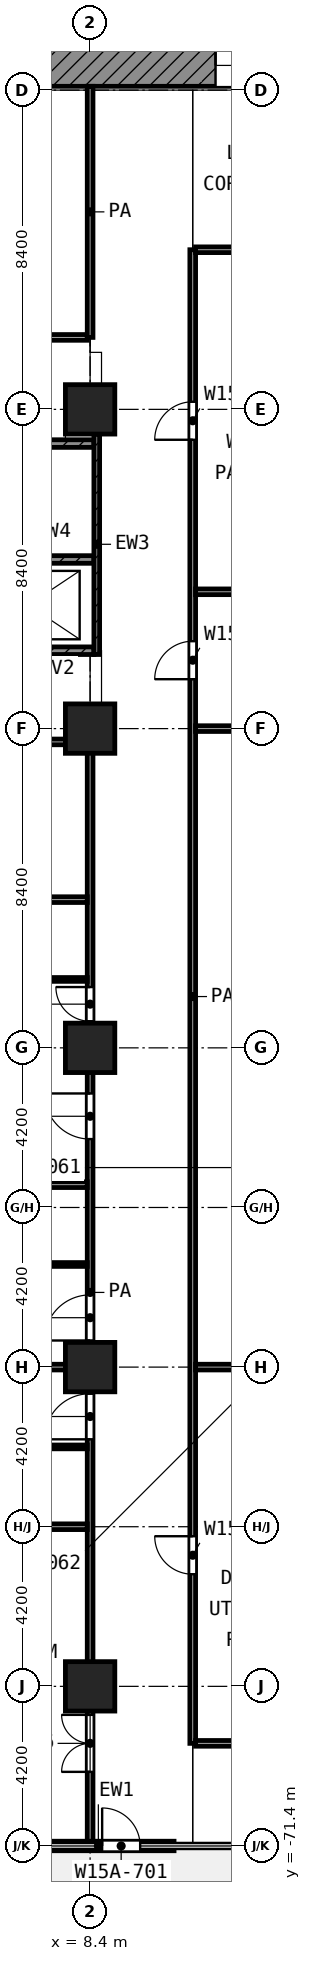
"""IFC4 building model, lengths in metres.
Left out: names, types, materials, properties, quantities, classifications, styles, units other than length and angle.
Written with IfcOpenShell. Run it as: python <this file> out.ifc"""

import sys

from ifc_helpers import new_model, si_unit, direction, frame, frame_2d, origin, origin_2d, place, context, subcontext, project, spatial, rectangle, extrude, element, fill, save


model = new_model("IFC4")
c1 = context("Model", 3, precision=1e-05, world=origin(), true_north=direction((0.0, 1.0)))
c2 = subcontext(c1, "Body", "Model", "MODEL_VIEW")
j1 = project(units=[si_unit("LENGTHUNIT", "METRE"), si_unit("PLANEANGLEUNIT", "RADIAN")], contexts=[c1])
p1 = place(None, origin())
s1 = spatial("IfcSite", under=j1, at=p1, CompositionType="ELEMENT")
p2 = place(p1, origin())
s2 = spatial("IfcBuilding", under=s1, at=p2, CompositionType="ELEMENT")
p3 = place(p2, frame((0.0, 0.0, 68.6)))
s3 = spatial("IfcBuildingStorey", under=s2, at=p3, CompositionType="ELEMENT", Elevation=68.6)
for number, where, z_axis, x_axis in (
    (1, (8.4, -33.6, 0.0), (0.0, 0.0, 1.0), (1.0, 0.0, 0.0)),
    (2, (8.4, -42.0, 0.0), (0.0, 0.0, 1.0), (1.0, 0.0, 0.0)),
    (3, (8.4, -50.4, 0.0), (0.0, 0.0, 1.0), (1.0, 0.0, 0.0)),
    (4, (8.4, -58.8, 0.0), (0.0, 0.0, 1.0), (1.0, 0.0, 0.0)),
    (5, (8.4, -67.2, 0.0), (0.0, 0.0, 1.0), (1.0, 0.0, 0.0)),
):
    element("IfcColumn", number, at=place(p3, frame(where, z_axis=z_axis, x_axis=x_axis)), inside=s3, PredefinedType="COLUMN", context=c2, shape_type="SweptSolid", body=[
        extrude(rectangle(XDim=1.3, YDim=1.3, at=origin_2d()), origin(), (0.0, 0.0, 1.0), 4.2),
    ])
p4 = place(p3, frame((6.625, -71.4, 0.0), z_axis=(0.0, 0.0, 1.0), x_axis=(1.0, 0.0, 0.0)))
e6 = element("IfcWall", 6, at=p4, inside=s3, PredefinedType="SOLIDWALL", context=c2, shape_type="SweptSolid", body=[
    extrude(rectangle(XDim=3.983, YDim=0.25, at=frame_2d((1.992, 0.0))), origin(), (0.0, 0.0, 1.0), 3.78),
])
p5 = place(p4, frame((2.092, 0.0, 0.0)))
e7 = element("IfcOpeningElement", 7, at=p5, cuts=e6, PredefinedType="OPENING", context=c2, shape_type="SweptSolid", body=[
    extrude(rectangle(XDim=1.0, YDim=2.1, at=frame_2d((0.5, 1.05))), frame((0.0, 0.135, 0.0), z_axis=(0.0, -1.0, 0.0), x_axis=(1.0, 0.0, 0.0)), (0.0, 0.0, 1.0), 0.27),
])
p6 = place(p3, frame((5.4, -24.55, 0.0), z_axis=(0.0, 0.0, 1.0), x_axis=(1.0, 0.0, 0.0)))
e8 = element("IfcWall", 8, at=p6, inside=s3, PredefinedType="SHEAR", context=c2, shape_type="SweptSolid", body=[
    extrude(rectangle(XDim=18.6, YDim=1.1, at=frame_2d((9.3, 0.0))), origin(), (0.0, 0.0, 1.0), 3.9),
])
p7 = place(p6, frame((6.3, 0.0, 0.0)))
e9 = element("IfcOpeningElement", 9, at=p7, cuts=e8, PredefinedType="OPENING", context=c2, shape_type="SweptSolid", body=[
    extrude(rectangle(XDim=1.8, YDim=2.1, at=frame_2d((0.9, 1.05))), frame((0.0, 0.56, 0.0), z_axis=(0.0, -1.0, 0.0), x_axis=(1.0, 0.0, 0.0)), (0.0, 0.0, 1.0), 1.12),
])
p8 = place(p3, frame((8.575, -40.05, 0.0), z_axis=(0.0, 0.0, 1.0), x_axis=(0.0, 1.0, 0.0)))
e10 = element("IfcWall", 10, at=p8, inside=s3, PredefinedType="SHEAR", context=c2, shape_type="SweptSolid", body=[
    extrude(rectangle(XDim=5.8, YDim=0.15, at=frame_2d((2.9, 0.0))), origin(), (0.0, 0.0, 1.0), 3.9),
])
p9 = place(p3, frame((0.45, -34.5, 0.0), z_axis=(0.0, 0.0, 1.0), x_axis=(1.0, 0.0, 0.0)))
e11 = element("IfcWall", 11, at=p9, inside=s3, PredefinedType="SHEAR", context=c2, shape_type="SweptSolid", body=[
    extrude(rectangle(XDim=8.05, YDim=0.2, at=frame_2d((4.025, 0.0))), origin(), (0.0, 0.0, 1.0), 3.9),
])
p10 = place(p9, frame((0.75, 0.0, 0.0)))
e12 = element("IfcOpeningElement", 12, at=p10, cuts=e11, PredefinedType="OPENING", context=c2, shape_type="SweptSolid", body=[
    extrude(rectangle(XDim=1.1, YDim=2.1, at=frame_2d((0.55, 1.05))), frame((0.0, 0.11, 0.0), z_axis=(0.0, -1.0, 0.0), x_axis=(1.0, 0.0, 0.0)), (0.0, 0.0, 1.0), 0.22),
])
p11 = place(p3, frame((0.45, -37.55, 0.0), z_axis=(0.0, 0.0, 1.0), x_axis=(1.0, 0.0, 0.0)))
e13 = element("IfcWall", 13, at=p11, inside=s3, PredefinedType="SHEAR", context=c2, shape_type="SweptSolid", body=[
    extrude(rectangle(XDim=8.05, YDim=0.2, at=frame_2d((4.025, 0.0))), origin(), (0.0, 0.0, 1.0), 3.9),
])
p12 = place(p11, frame((0.1, 0.0, 0.0)))
e14 = element("IfcOpeningElement", 14, at=p12, cuts=e13, PredefinedType="OPENING", context=c2, shape_type="SweptSolid", body=[
    extrude(rectangle(XDim=1.1, YDim=2.1, at=frame_2d((0.55, 1.05))), frame((0.0, 0.11, 0.0), z_axis=(0.0, -1.0, 0.0), x_axis=(1.0, 0.0, 0.0)), (0.0, 0.0, 1.0), 0.22),
])
p13 = place(p3, frame((0.45, -39.95, 0.0), z_axis=(0.0, 0.0, 1.0), x_axis=(1.0, 0.0, 0.0)))
e15 = element("IfcWall", 15, at=p13, inside=s3, PredefinedType="SHEAR", context=c2, shape_type="SweptSolid", body=[
    extrude(rectangle(XDim=8.05, YDim=0.2, at=frame_2d((4.025, 0.0))), origin(), (0.0, 0.0, 1.0), 3.9),
])
p14 = place(p13, frame((2.0, 0.0, 0.0)))
e16 = element("IfcOpeningElement", 16, at=p14, cuts=e15, PredefinedType="OPENING", context=c2, shape_type="SweptSolid", body=[
    extrude(rectangle(XDim=1.1, YDim=2.1, at=frame_2d((0.55, 1.05))), frame((0.0, 0.11, 0.0), z_axis=(0.0, -1.0, 0.0), x_axis=(1.0, 0.0, 0.0)), (0.0, 0.0, 1.0), 0.22),
])
for number, where, z_axis, x_axis in (
    (17, (5.75, -60.9, 0.0), (0.0, 0.0, 1.0), (1.0, 0.0, 0.0)),
    (18, (5.75, -56.1, 0.0), (0.0, 0.0, 1.0), (1.0, 0.0, 0.0)),
):
    element("IfcWall", number, at=place(p3, frame(where, z_axis=z_axis, x_axis=x_axis)), inside=s3, PredefinedType="PARTITIONING", context=c2, shape_type="SweptSolid", body=[
        extrude(rectangle(XDim=2.575, YDim=0.1, at=frame_2d((1.288, 0.0))), origin(), (0.0, 0.0, 1.0), 3.9),
    ])
p15 = place(p3, frame((5.751, -48.6, 0.0), z_axis=(0.0, 0.0, 1.0), x_axis=(1.0, 0.0, 0.0)))
e19 = element("IfcWall", 19, at=p15, inside=s3, PredefinedType="PARTITIONING", context=c2, shape_type="SweptSolid", body=[
    extrude(rectangle(XDim=2.574, YDim=0.1, at=frame_2d((1.287, 0.0))), origin(), (0.0, 0.0, 1.0), 3.9),
])
p16 = place(p3, frame((11.175, -68.7, 0.0), z_axis=(0.0, 0.0, 1.0), x_axis=(1.0, 0.0, 0.0)))
e20 = element("IfcWall", 20, at=p16, inside=s3, PredefinedType="PARTITIONING", context=c2, shape_type="SweptSolid", body=[
    extrude(rectangle(XDim=2.85, YDim=0.15, at=frame_2d((1.425, 0.0))), origin(), (0.0, 0.0, 1.0), 3.9),
])
for number, where, z_axis, x_axis in (
    (21, (0.08, -63.0, 0.0), (0.0, 0.0, 1.0), (1.0, 0.0, 0.0)),
    (22, (0.08, -58.8, 0.0), (0.0, 0.0, 1.0), (1.0, 0.0, 0.0)),
):
    element("IfcWall", number, at=place(p3, frame(where, z_axis=z_axis, x_axis=x_axis)), inside=s3, PredefinedType="PARTITIONING", context=c2, shape_type="SweptSolid", body=[
        extrude(rectangle(XDim=8.245, YDim=0.15, at=frame_2d((4.123, 0.0))), origin(), (0.0, 0.0, 1.0), 3.9),
    ])
p17 = place(p3, frame((11.175, -58.8, 0.0), z_axis=(0.0, 0.0, 1.0), x_axis=(1.0, 0.0, 0.0)))
e23 = element("IfcWall", 23, at=p17, inside=s3, PredefinedType="PARTITIONING", context=c2, shape_type="SweptSolid", body=[
    extrude(rectangle(XDim=2.85, YDim=0.15, at=frame_2d((1.425, 0.0))), origin(), (0.0, 0.0, 1.0), 3.9),
])
for number, where, z_axis, x_axis in (
    (24, (0.08, -54.0, 0.0), (0.0, 0.0, 1.0), (1.0, 0.0, 0.0)),
    (25, (0.08, -46.5, 0.0), (0.0, 0.0, 1.0), (1.0, 0.0, 0.0)),
):
    element("IfcWall", number, at=place(p3, frame(where, z_axis=z_axis, x_axis=x_axis)), inside=s3, PredefinedType="PARTITIONING", context=c2, shape_type="SweptSolid", body=[
        extrude(rectangle(XDim=8.245, YDim=0.15, at=frame_2d((4.123, 0.0))), origin(), (0.0, 0.0, 1.0), 3.9),
    ])
p18 = place(p3, frame((2.326, -42.35, 0.0), z_axis=(0.0, 0.0, 1.0), x_axis=(1.0, 0.0, 0.0)))
e26 = element("IfcWall", 26, at=p18, inside=s3, PredefinedType="PARTITIONING", context=c2, shape_type="SweptSolid", body=[
    extrude(rectangle(XDim=5.999, YDim=0.15, at=frame_2d((3.0, 0.0))), origin(), (0.0, 0.0, 1.0), 3.9),
])
p19 = place(p18, frame((2.499, 0.0, 0.0)))
e27 = element("IfcOpeningElement", 27, at=p19, cuts=e26, PredefinedType="OPENING", context=c2, shape_type="SweptSolid", body=[
    extrude(rectangle(XDim=1.0, YDim=2.1, at=frame_2d((0.5, 1.05))), frame((0.0, 0.085, 0.0), z_axis=(0.0, -1.0, 0.0), x_axis=(1.0, 0.0, 0.0)), (0.0, 0.0, 1.0), 0.17),
])
for number, where, z_axis, x_axis in (
    (28, (11.175, -42.0, 0.0), (0.0, 0.0, 1.0), (1.0, 0.0, 0.0)),
    (29, (11.175, -38.4, 0.0), (0.0, 0.0, 1.0), (1.0, 0.0, 0.0)),
):
    element("IfcWall", number, at=place(p3, frame(where, z_axis=z_axis, x_axis=x_axis)), inside=s3, PredefinedType="PARTITIONING", context=c2, shape_type="SweptSolid", body=[
        extrude(rectangle(XDim=2.85, YDim=0.15, at=frame_2d((1.425, 0.0))), origin(), (0.0, 0.0, 1.0), 3.9),
    ])
p20 = place(p3, frame((1.077, -31.707, 0.0), z_axis=(0.0, 0.0, 1.0), x_axis=(1.0, 0.0, 0.0)))
e30 = element("IfcWall", 30, at=p20, inside=s3, PredefinedType="PARTITIONING", context=c2, shape_type="SweptSolid", body=[
    extrude(rectangle(XDim=7.248, YDim=0.15, at=frame_2d((3.624, 0.0))), origin(), (0.0, 0.0, 1.0), 3.9),
])
p21 = place(p20, frame((3.124, 0.0, 0.0)))
e31 = element("IfcOpeningElement", 31, at=p21, cuts=e30, PredefinedType="OPENING", context=c2, shape_type="SweptSolid", body=[
    extrude(rectangle(XDim=1.0, YDim=2.1, at=frame_2d((0.5, 1.05))), frame((0.0, 0.085, 0.0), z_axis=(0.0, -1.0, 0.0), x_axis=(1.0, 0.0, 0.0)), (0.0, 0.0, 1.0), 0.17),
])
p22 = place(p3, frame((11.175, -29.4, 0.0), z_axis=(0.0, 0.0, 1.0), x_axis=(1.0, 0.0, 0.0)))
e32 = element("IfcWall", 32, at=p22, inside=s3, PredefinedType="PARTITIONING", context=c2, shape_type="SweptSolid", body=[
    extrude(rectangle(XDim=2.85, YDim=0.15, at=frame_2d((1.425, 0.0))), origin(), (0.0, 0.0, 1.0), 3.9),
])
p23 = place(p3, frame((8.4, -71.32, 0.0), z_axis=(0.0, 0.0, 1.0), x_axis=(0.0, 1.0, 0.0)))
e33 = element("IfcWall", 33, at=p23, inside=s3, PredefinedType="PARTITIONING", context=c2, shape_type="SweptSolid", body=[
    extrude(rectangle(XDim=28.97, YDim=0.15, at=frame_2d((14.485, 0.0))), origin(), (0.0, 0.0, 1.0), 3.9),
])
p24 = place(p23, frame((18.52, 0.0, 0.0)))
e34 = element("IfcOpeningElement", 34, at=p24, cuts=e33, PredefinedType="OPENING", context=c2, shape_type="SweptSolid", body=[
    extrude(rectangle(XDim=1.2, YDim=2.1, at=frame_2d((0.6, 1.05))), frame((0.0, 0.085, 0.0), z_axis=(0.0, -1.0, 0.0), x_axis=(1.0, 0.0, 0.0)), (0.0, 0.0, 1.0), 0.17),
])
p25 = place(p23, frame((21.62, 0.0, 0.0)))
e35 = element("IfcOpeningElement", 35, at=p25, cuts=e33, PredefinedType="OPENING", context=c2, shape_type="SweptSolid", body=[
    extrude(rectangle(XDim=0.9, YDim=2.1, at=frame_2d((0.45, 1.05))), frame((0.0, 0.085, 0.0), z_axis=(0.0, -1.0, 0.0), x_axis=(1.0, 0.0, 0.0)), (0.0, 0.0, 1.0), 0.17),
])
p26 = place(p23, frame((13.22, 0.0, 0.0)))
e36 = element("IfcOpeningElement", 36, at=p26, cuts=e33, PredefinedType="OPENING", context=c2, shape_type="SweptSolid", body=[
    extrude(rectangle(XDim=1.2, YDim=2.1, at=frame_2d((0.6, 1.05))), frame((0.0, 0.085, 0.0), z_axis=(0.0, -1.0, 0.0), x_axis=(1.0, 0.0, 0.0)), (0.0, 0.0, 1.0), 0.17),
])
p27 = place(p23, frame((10.62, 0.0, 0.0)))
e37 = element("IfcOpeningElement", 37, at=p27, cuts=e33, PredefinedType="OPENING", context=c2, shape_type="SweptSolid", body=[
    extrude(rectangle(XDim=1.2, YDim=2.1, at=frame_2d((0.6, 1.05))), frame((0.0, 0.085, 0.0), z_axis=(0.0, -1.0, 0.0), x_axis=(1.0, 0.0, 0.0)), (0.0, 0.0, 1.0), 0.17),
])
p28 = place(p23, frame((1.87, 0.0, 0.0)))
e38 = element("IfcOpeningElement", 38, at=p28, cuts=e33, PredefinedType="OPENING", context=c2, shape_type="SweptSolid", body=[
    extrude(rectangle(XDim=1.5, YDim=2.1, at=frame_2d((0.75, 1.05))), frame((0.0, 0.085, 0.0), z_axis=(0.0, -1.0, 0.0), x_axis=(1.0, 0.0, 0.0)), (0.0, 0.0, 1.0), 0.17),
])
p29 = place(p3, frame((8.4, -31.707, 0.0), z_axis=(0.0, 0.0, 1.0), x_axis=(0.0, 1.0, 0.0)))
e39 = element("IfcWall", 39, at=p29, inside=s3, PredefinedType="PARTITIONING", context=c2, shape_type="SweptSolid", body=[
    extrude(rectangle(XDim=6.607, YDim=0.15, at=frame_2d((3.303, 0.0))), origin(), (0.0, 0.0, 1.0), 3.9),
])
p30 = place(p3, frame((11.1, -68.7, 0.0), z_axis=(0.0, 0.0, 1.0), x_axis=(0.0, 1.0, 0.0)))
e40 = element("IfcWall", 40, at=p30, inside=s3, PredefinedType="PARTITIONING", context=c2, shape_type="SweptSolid", body=[
    extrude(rectangle(XDim=39.3, YDim=0.15, at=frame_2d((19.65, 0.0))), origin(), (0.0, 0.0, 1.0), 3.9),
])
p31 = place(p30, frame((34.3, 0.0, 0.0)))
e41 = element("IfcOpeningElement", 41, at=p31, cuts=e40, PredefinedType="OPENING", context=c2, shape_type="SweptSolid", body=[
    extrude(rectangle(XDim=1.0, YDim=2.1, at=frame_2d((0.5, 1.05))), frame((0.0, 0.085, 0.0), z_axis=(0.0, -1.0, 0.0), x_axis=(1.0, 0.0, 0.0)), (0.0, 0.0, 1.0), 0.17),
])
p32 = place(p30, frame((28.0, 0.0, 0.0)))
e42 = element("IfcOpeningElement", 42, at=p32, cuts=e40, PredefinedType="OPENING", context=c2, shape_type="SweptSolid", body=[
    extrude(rectangle(XDim=1.0, YDim=2.1, at=frame_2d((0.5, 1.05))), frame((0.0, 0.085, 0.0), z_axis=(0.0, -1.0, 0.0), x_axis=(1.0, 0.0, 0.0)), (0.0, 0.0, 1.0), 0.17),
])
p33 = place(p30, frame((4.45, 0.0, 0.0)))
e43 = element("IfcOpeningElement", 43, at=p33, cuts=e40, PredefinedType="OPENING", context=c2, shape_type="SweptSolid", body=[
    extrude(rectangle(XDim=1.0, YDim=2.1, at=frame_2d((0.5, 1.05))), frame((0.0, 0.085, 0.0), z_axis=(0.0, -1.0, 0.0), x_axis=(1.0, 0.0, 0.0)), (0.0, 0.0, 1.0), 0.17),
])
p34 = place(p5, origin())
e44 = element("IfcDoor", 44, at=p34, inside=s3, OperationType="SINGLE_SWING_LEFT", PredefinedType="DOOR", context=c2, shape_type="SweptSolid", body=[
    extrude(rectangle(XDim=1.0, YDim=2.1, at=frame_2d((0.5, 1.05))), frame((0.0, 0.025, 0.0), z_axis=(0.0, -1.0, 0.0), x_axis=(1.0, 0.0, 0.0)), (0.0, 0.0, 1.0), 0.05),
])
fill(e7, e44)
p35 = place(p7, origin())
e45 = element("IfcDoor", 45, at=p35, inside=s3, OperationType="DOUBLE_DOOR_SINGLE_SWING", PredefinedType="DOOR", context=c2, shape_type="SweptSolid", body=[
    extrude(rectangle(XDim=1.8, YDim=2.1, at=frame_2d((0.9, 1.05))), frame((0.0, 0.025, 0.0), z_axis=(0.0, -1.0, 0.0), x_axis=(1.0, 0.0, 0.0)), (0.0, 0.0, 1.0), 0.05),
])
fill(e9, e45)
p36 = place(p24, origin())
e46 = element("IfcDoor", 46, at=p36, inside=s3, OperationType="SINGLE_SWING_RIGHT", PredefinedType="DOOR", context=c2, shape_type="SweptSolid", body=[
    extrude(rectangle(XDim=1.2, YDim=2.1, at=frame_2d((0.6, 1.05))), frame((0.0, 0.025, 0.0), z_axis=(0.0, -1.0, 0.0), x_axis=(1.0, 0.0, 0.0)), (0.0, 0.0, 1.0), 0.05),
])
fill(e34, e46)
p37 = place(p25, origin())
e47 = element("IfcDoor", 47, at=p37, inside=s3, OperationType="SINGLE_SWING_RIGHT", PredefinedType="DOOR", context=c2, shape_type="SweptSolid", body=[
    extrude(rectangle(XDim=0.9, YDim=2.1, at=frame_2d((0.45, 1.05))), frame((0.0, 0.025, 0.0), z_axis=(0.0, -1.0, 0.0), x_axis=(1.0, 0.0, 0.0)), (0.0, 0.0, 1.0), 0.05),
])
fill(e35, e47)
p38 = place(p26, origin())
e48 = element("IfcDoor", 48, at=p38, inside=s3, OperationType="SINGLE_SWING_LEFT", PredefinedType="DOOR", context=c2, shape_type="SweptSolid", body=[
    extrude(rectangle(XDim=1.2, YDim=2.1, at=frame_2d((0.6, 1.05))), frame((0.0, 0.025, 0.0), z_axis=(0.0, -1.0, 0.0), x_axis=(1.0, 0.0, 0.0)), (0.0, 0.0, 1.0), 0.05),
])
fill(e36, e48)
p39 = place(p27, origin())
e49 = element("IfcDoor", 49, at=p39, inside=s3, OperationType="SINGLE_SWING_LEFT", PredefinedType="DOOR", context=c2, shape_type="SweptSolid", body=[
    extrude(rectangle(XDim=1.2, YDim=2.1, at=frame_2d((0.6, 1.05))), frame((0.0, 0.025, 0.0), z_axis=(0.0, -1.0, 0.0), x_axis=(1.0, 0.0, 0.0)), (0.0, 0.0, 1.0), 0.05),
])
fill(e37, e49)
p40 = place(p28, origin())
e50 = element("IfcDoor", 50, at=p40, inside=s3, OperationType="DOUBLE_DOOR_SINGLE_SWING", PredefinedType="DOOR", context=c2, shape_type="SweptSolid", body=[
    extrude(rectangle(XDim=1.5, YDim=2.1, at=frame_2d((0.75, 1.05))), frame((0.0, 0.025, 0.0), z_axis=(0.0, -1.0, 0.0), x_axis=(1.0, 0.0, 0.0)), (0.0, 0.0, 1.0), 0.05),
])
fill(e38, e50)
p41 = place(p31, origin())
e51 = element("IfcDoor", 51, at=p41, inside=s3, OperationType="SINGLE_SWING_LEFT", PredefinedType="DOOR", context=c2, shape_type="SweptSolid", body=[
    extrude(rectangle(XDim=1.0, YDim=2.1, at=frame_2d((0.5, 1.05))), frame((0.0, 0.025, 0.0), z_axis=(0.0, -1.0, 0.0), x_axis=(1.0, 0.0, 0.0)), (0.0, 0.0, 1.0), 0.05),
])
fill(e41, e51)
p42 = place(p32, origin())
e52 = element("IfcDoor", 52, at=p42, inside=s3, OperationType="SINGLE_SWING_LEFT", PredefinedType="DOOR", context=c2, shape_type="SweptSolid", body=[
    extrude(rectangle(XDim=1.0, YDim=2.1, at=frame_2d((0.5, 1.05))), frame((0.0, 0.025, 0.0), z_axis=(0.0, -1.0, 0.0), x_axis=(1.0, 0.0, 0.0)), (0.0, 0.0, 1.0), 0.05),
])
fill(e42, e52)
p43 = place(p33, origin())
e53 = element("IfcDoor", 53, at=p43, inside=s3, OperationType="SINGLE_SWING_RIGHT", PredefinedType="DOOR", context=c2, shape_type="SweptSolid", body=[
    extrude(rectangle(XDim=1.0, YDim=2.1, at=frame_2d((0.5, 1.05))), frame((0.0, 0.025, 0.0), z_axis=(0.0, -1.0, 0.0), x_axis=(1.0, 0.0, 0.0)), (0.0, 0.0, 1.0), 0.05),
])
fill(e43, e53)
save(model, sys.argv[1])
